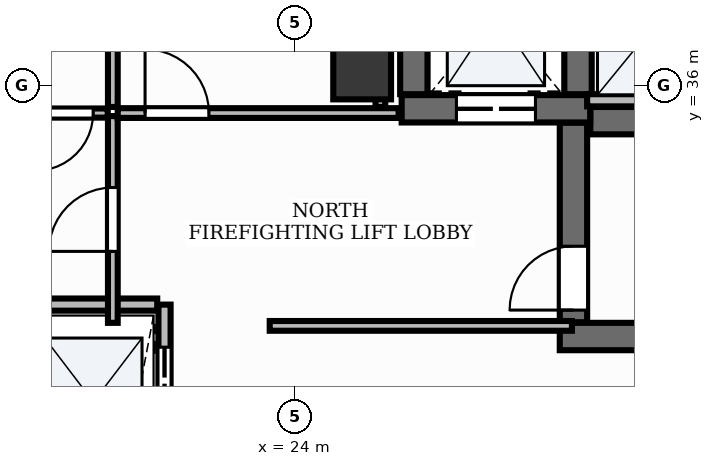
"""IFC4 building model, lengths in metres.
Left out: names, types, materials, properties, quantities, classifications, styles, units other than length and angle.
Written with IfcOpenShell. Run it as: python <this file> out.ifc"""

import sys

from ifc_helpers import new_model, si_unit, direction, frame, frame_2d, origin, origin_2d, place, context, subcontext, project, spatial, rectangle, extrude, element, fill, save


model = new_model("IFC4")
c1 = context("Model", 3, precision=1e-05, world=origin(), true_north=direction((0.0, 1.0)))
c2 = subcontext(c1, "Body", "Model", "MODEL_VIEW")
j1 = project(units=[si_unit("LENGTHUNIT", "METRE"), si_unit("PLANEANGLEUNIT", "RADIAN")], contexts=[c1])
p1 = place(None, origin())
s1 = spatial("IfcSite", under=j1, at=p1, CompositionType="ELEMENT")
p2 = place(p1, origin())
s2 = spatial("IfcBuilding", under=s1, at=p2, CompositionType="ELEMENT")
p3 = place(p2, origin())
s3 = spatial("IfcBuildingStorey", under=s2, at=p3, CompositionType="ELEMENT", Elevation=0.0)
p4 = place(p3, frame((28.852, 35.425, 0.0), z_axis=(0.0, 0.0, 1.0), x_axis=(1.0, 0.0, 0.0)))
e1 = element("IfcWall", 1, at=p4, inside=s3, PredefinedType="SHEAR", context=c2, shape_type="SweptSolid", body=[
    extrude(rectangle(XDim=8.248, YDim=0.45, at=frame_2d((4.124, 0.0))), origin(), (0.0, 0.0, 1.0), 5.1),
])
p5 = place(p3, frame((28.35, 31.875, 0.0), z_axis=(0.0, 0.0, 1.0), x_axis=(1.0, 0.0, 0.0)))
e2 = element("IfcWall", 2, at=p5, inside=s3, PredefinedType="SHEAR", context=c2, shape_type="SweptSolid", body=[
    extrude(rectangle(XDim=8.75, YDim=0.45, at=frame_2d((4.375, 0.0))), origin(), (0.0, 0.0, 1.0), 5.1),
])
p6 = place(p3, frame((28.575, 32.11, 0.0), z_axis=(0.0, 0.0, 1.0), x_axis=(0.0, 1.0, 0.0)))
e3 = element("IfcWall", 3, at=p6, inside=s3, PredefinedType="SHEAR", context=c2, shape_type="SweptSolid", body=[
    extrude(rectangle(XDim=3.283, YDim=0.45, at=frame_2d((1.642, 0.0))), origin(), (0.0, 0.0, 1.0), 5.1),
])
p7 = place(p6, frame((0.2, 0.0, 0.0)))
e4 = element("IfcOpeningElement", 4, at=p7, cuts=e3, PredefinedType="OPENING", context=c2, shape_type="SweptSolid", body=[
    extrude(rectangle(XDim=1.05, YDim=2.15, at=frame_2d((0.525, 1.075))), frame((0.0, 0.24, 0.0), z_axis=(0.0, -1.0, 0.0), x_axis=(1.0, 0.0, 0.0)), (0.0, 0.0, 1.0), 0.48),
])
p8 = place(p3, frame((25.75, 35.62, 0.0), z_axis=(0.0, 0.0, 1.0), x_axis=(1.0, 0.0, 0.0)))
e5 = element("IfcWall", 5, at=p8, inside=s3, PredefinedType="SHEAR", context=c2, shape_type="SweptSolid", body=[
    extrude(rectangle(XDim=3.1, YDim=0.45, at=frame_2d((1.55, 0.0))), origin(), (0.0, 0.0, 1.0), 5.1),
])
p9 = place(p8, frame((0.9, 0.0, 0.0)))
e6 = element("IfcOpeningElement", 6, at=p9, cuts=e5, PredefinedType="OPENING", context=c2, shape_type="SweptSolid", body=[
    extrude(rectangle(XDim=1.3, YDim=2.2, at=frame_2d((0.65, 1.1))), frame((0.0, 0.24, 0.0), z_axis=(0.0, -1.0, 0.0), x_axis=(1.0, 0.0, 0.0)), (0.0, 0.0, 1.0), 0.48),
])
for number, where, z_axis, x_axis in (
    (7, (25.95, 35.86, 0.0), (0.0, 0.0, 1.0), (0.0, 1.0, 0.0)),
    (8, (28.65, 35.86, 0.0), (0.0, 0.0, 1.0), (0.0, 1.0, 0.0)),
):
    element("IfcWall", number, at=place(p3, frame(where, z_axis=z_axis, x_axis=x_axis)), inside=s3, PredefinedType="SHEAR", context=c2, shape_type="SweptSolid", body=[
        extrude(rectangle(XDim=2.7, YDim=0.45, at=frame_2d((1.35, 0.0))), origin(), (0.0, 0.0, 1.0), 5.1),
    ])
p10 = place(p3, frame((25.1, 36.25, -0.0), z_axis=(0.0, 0.0, 1.0), x_axis=(1.0, 0.0, 0.0)))
e9 = element("IfcColumn", 9, at=p10, inside=s3, PredefinedType="PILASTER", context=c2, shape_type="SweptSolid", body=[
    extrude(rectangle(XDim=0.95, YDim=0.95, at=origin_2d()), origin(), (0.0, 0.0, 1.0), 5.101),
])
p11 = place(p3, frame((21.85, 21.6, 0.0), z_axis=(0.0, 0.0, 1.0), x_axis=(0.0, 1.0, 0.0)))
e10 = element("IfcWall", 10, at=p11, inside=s3, PredefinedType="PARTITIONING", context=c2, shape_type="SweptSolid", body=[
    extrude(rectangle(XDim=10.8, YDim=0.2, at=frame_2d((5.4, 0.0))), origin(), (0.0, 0.0, 1.0), 4.11),
])
p12 = place(p11, frame((0.9, 0.0, 0.0)))
e11 = element("IfcOpeningElement", 11, at=p12, cuts=e10, PredefinedType="OPENING", context=c2, shape_type="SweptSolid", body=[
    extrude(rectangle(XDim=1.1, YDim=2.2, at=frame_2d((0.55, 1.1))), frame((0.0, 0.115, 0.0), z_axis=(0.0, -1.0, 0.0), x_axis=(1.0, 0.0, 0.0)), (0.0, 0.0, 1.0), 0.23),
])
p13 = place(p11, frame((3.6, 0.0, 0.0)))
e12 = element("IfcOpeningElement", 12, at=p13, cuts=e10, PredefinedType="OPENING", context=c2, shape_type="SweptSolid", body=[
    extrude(rectangle(XDim=1.1, YDim=2.2, at=frame_2d((0.55, 1.1))), frame((0.0, 0.115, 0.0), z_axis=(0.0, -1.0, 0.0), x_axis=(1.0, 0.0, 0.0)), (0.0, 0.0, 1.0), 0.23),
])
p14 = place(p11, frame((6.3, 0.0, 0.0)))
e13 = element("IfcOpeningElement", 13, at=p14, cuts=e10, PredefinedType="OPENING", context=c2, shape_type="SweptSolid", body=[
    extrude(rectangle(XDim=1.1, YDim=2.2, at=frame_2d((0.55, 1.1))), frame((0.0, 0.115, 0.0), z_axis=(0.0, -1.0, 0.0), x_axis=(1.0, 0.0, 0.0)), (0.0, 0.0, 1.0), 0.23),
])
p15 = place(p11, frame((9.0, 0.0, 0.0)))
e14 = element("IfcOpeningElement", 14, at=p15, cuts=e10, PredefinedType="OPENING", context=c2, shape_type="SweptSolid", body=[
    extrude(rectangle(XDim=1.1, YDim=2.2, at=frame_2d((0.55, 1.1))), frame((0.0, 0.115, 0.0), z_axis=(0.0, -1.0, 0.0), x_axis=(1.0, 0.0, 0.0)), (0.0, 0.0, 1.0), 0.23),
])
p16 = place(p3, frame((19.62, 32.4, 0.0), z_axis=(0.0, 0.0, 1.0), x_axis=(1.0, 0.0, 0.0)))
e15 = element("IfcWall", 15, at=p16, inside=s3, PredefinedType="PARTITIONING", context=c2, shape_type="SweptSolid", body=[
    extrude(rectangle(XDim=2.11, YDim=0.2, at=frame_2d((1.055, 0.0))), origin(), (0.0, 0.0, 1.0), 4.11),
])
p17 = place(p3, frame((28.8, 35.76, 0.0), z_axis=(0.0, 0.0, 1.0), x_axis=(1.0, 0.0, 0.0)))
e16 = element("IfcWall", 16, at=p17, inside=s3, PredefinedType="PARTITIONING", context=c2, shape_type="SweptSolid", body=[
    extrude(rectangle(XDim=4.57, YDim=0.2, at=frame_2d((2.285, 0.0))), origin(), (0.0, 0.0, 1.0), 4.11),
])
p18 = place(p3, frame((21.0, 32.1, 0.0), z_axis=(0.0, 0.0, 1.0), x_axis=(0.0, 1.0, 0.0)))
e17 = element("IfcWall", 17, at=p18, inside=s3, PredefinedType="PARTITIONING", context=c2, shape_type="SweptSolid", body=[
    extrude(rectangle(XDim=3.4, YDim=0.16, at=frame_2d((1.7, 0.0))), origin(), (0.0, 0.0, 1.0), 4.11),
])
p19 = place(p18, frame((1.175, 0.0, 0.0)))
e18 = element("IfcOpeningElement", 18, at=p19, cuts=e17, PredefinedType="OPENING", context=c2, shape_type="SweptSolid", body=[
    extrude(rectangle(XDim=1.05, YDim=2.15, at=frame_2d((0.525, 1.075))), frame((0.0, 0.095, 0.0), z_axis=(0.0, -1.0, 0.0), x_axis=(1.0, 0.0, 0.0)), (0.0, 0.0, 1.0), 0.19),
])
p20 = place(p3, frame((23.58, 32.05, 0.0), z_axis=(0.0, 0.0, 1.0), x_axis=(1.0, 0.0, 0.0)))
e19 = element("IfcWall", 19, at=p20, inside=s3, PredefinedType="PARTITIONING", context=c2, shape_type="SweptSolid", body=[
    extrude(rectangle(XDim=4.97, YDim=0.16, at=frame_2d((2.485, 0.0))), origin(), (0.0, 0.0, 1.0), 4.11),
])
p21 = place(p3, frame((21.08, 35.55, 0.0), z_axis=(0.0, 0.0, 1.0), x_axis=(1.0, 0.0, 0.0)))
e20 = element("IfcWall", 20, at=p21, inside=s3, PredefinedType="PARTITIONING", context=c2, shape_type="SweptSolid", body=[
    extrude(rectangle(XDim=4.62, YDim=0.16, at=frame_2d((2.31, 0.0))), origin(), (0.0, 0.0, 1.0), 4.11),
])
p22 = place(p21, frame((0.45, 0.0, 0.0)))
e21 = element("IfcOpeningElement", 21, at=p22, cuts=e20, PredefinedType="OPENING", context=c2, shape_type="SweptSolid", body=[
    extrude(rectangle(XDim=1.05, YDim=2.15, at=frame_2d((0.525, 1.075))), frame((0.0, 0.095, 0.0), z_axis=(0.0, -1.0, 0.0), x_axis=(1.0, 0.0, 0.0)), (0.0, 0.0, 1.0), 0.19),
])
p23 = place(p3, frame((21.0, 48.55, 0.0), z_axis=(0.0, 0.0, 1.0), x_axis=(0.0, -1.0, 0.0)))
e22 = element("IfcWall", 22, at=p23, inside=s3, PredefinedType="PARTITIONING", context=c2, shape_type="SweptSolid", body=[
    extrude(rectangle(XDim=12.9, YDim=0.16, at=frame_2d((6.45, 0.0))), origin(), (0.0, 0.0, 1.0), 4.11),
])
p24 = place(p23, frame((5.5, 0.0, 0.0)))
e23 = element("IfcOpeningElement", 23, at=p24, cuts=e22, PredefinedType="OPENING", context=c2, shape_type="SweptSolid", body=[
    extrude(rectangle(XDim=1.05, YDim=2.15, at=frame_2d((0.525, 1.075))), frame((0.0, 0.095, 0.0), z_axis=(0.0, -1.0, 0.0), x_axis=(1.0, 0.0, 0.0)), (0.0, 0.0, 1.0), 0.19),
])
p25 = place(p3, frame((25.4, 35.65, 0.0), z_axis=(0.0, 0.0, 1.0), x_axis=(0.0, 1.0, 0.0)))
e24 = element("IfcWall", 24, at=p25, inside=s3, PredefinedType="PARTITIONING", context=c2, shape_type="SweptSolid", body=[
    extrude(rectangle(XDim=13.75, YDim=0.16, at=frame_2d((6.875, 0.0))), origin(), (0.0, 0.0, 1.0), 4.11),
])
p26 = place(p3, frame((20.916, 35.55, 0.0), z_axis=(0.0, 0.0, 1.0), x_axis=(-1.0, 0.0, 0.0)))
e25 = element("IfcWall", 25, at=p26, inside=s3, PredefinedType="PARTITIONING", context=c2, shape_type="SweptSolid", body=[
    extrude(rectangle(XDim=1.964, YDim=0.15, at=frame_2d((0.982, 0.0))), origin(), (0.0, 0.0, 1.0), 4.11),
])
p27 = place(p26, frame((0.24, 0.0, 0.0)))
e26 = element("IfcOpeningElement", 26, at=p27, cuts=e25, PredefinedType="OPENING", context=c2, shape_type="SweptSolid", body=[
    extrude(rectangle(XDim=0.95, YDim=2.15, at=frame_2d((0.475, 1.075))), frame((0.0, 0.09, 0.0), z_axis=(0.0, -1.0, 0.0), x_axis=(1.0, 0.0, 0.0)), (0.0, 0.0, 1.0), 0.18),
])
p28 = place(p7, origin())
e27 = element("IfcDoor", 27, at=p28, inside=s3, OperationType="SINGLE_SWING_LEFT", PredefinedType="DOOR", context=c2, shape_type="SweptSolid", body=[
    extrude(rectangle(XDim=1.05, YDim=2.15, at=frame_2d((0.525, 1.075))), frame((0.0, 0.025, 0.0), z_axis=(0.0, -1.0, 0.0), x_axis=(1.0, 0.0, 0.0)), (0.0, 0.0, 1.0), 0.05),
])
fill(e4, e27)
p29 = place(p15, origin())
e28 = element("IfcDoor", 28, at=p29, inside=s3, OperationType="DOUBLE_DOOR_SLIDING", PredefinedType="DOOR", context=c2, shape_type="SweptSolid", body=[
    extrude(rectangle(XDim=1.1, YDim=2.2, at=frame_2d((0.55, 1.1))), frame((0.0, 0.025, 0.0), z_axis=(0.0, -1.0, 0.0), x_axis=(1.0, 0.0, 0.0)), (0.0, 0.0, 1.0), 0.05),
])
fill(e14, e28)
p30 = place(p9, origin())
e29 = element("IfcDoor", 29, at=p30, inside=s3, OperationType="DOUBLE_DOOR_SLIDING", PredefinedType="DOOR", context=c2, shape_type="SweptSolid", body=[
    extrude(rectangle(XDim=1.3, YDim=2.2, at=frame_2d((0.65, 1.1))), frame((0.0, 0.025, 0.0), z_axis=(0.0, -1.0, 0.0), x_axis=(1.0, 0.0, 0.0)), (0.0, 0.0, 1.0), 0.05),
])
fill(e6, e29)
p31 = place(p19, origin())
e30 = element("IfcDoor", 30, at=p31, inside=s3, OperationType="SINGLE_SWING_LEFT", PredefinedType="DOOR", context=c2, shape_type="SweptSolid", body=[
    extrude(rectangle(XDim=1.05, YDim=2.15, at=frame_2d((0.525, 1.075))), frame((0.0, 0.025, 0.0), z_axis=(0.0, -1.0, 0.0), x_axis=(1.0, 0.0, 0.0)), (0.0, 0.0, 1.0), 0.05),
])
fill(e18, e30)
p32 = place(p22, origin())
e31 = element("IfcDoor", 31, at=p32, inside=s3, OperationType="SINGLE_SWING_LEFT", PredefinedType="DOOR", context=c2, shape_type="SweptSolid", body=[
    extrude(rectangle(XDim=1.05, YDim=2.15, at=frame_2d((0.525, 1.075))), frame((0.0, 0.025, 0.0), z_axis=(0.0, -1.0, 0.0), x_axis=(1.0, 0.0, 0.0)), (0.0, 0.0, 1.0), 0.05),
])
fill(e21, e31)
p33 = place(p27, origin())
e32 = element("IfcDoor", 32, at=p33, inside=s3, OperationType="SINGLE_SWING_RIGHT", PredefinedType="DOOR", context=c2, shape_type="SweptSolid", body=[
    extrude(rectangle(XDim=0.95, YDim=2.15, at=frame_2d((0.475, 1.075))), frame((0.0, 0.025, 0.0), z_axis=(0.0, -1.0, 0.0), x_axis=(1.0, 0.0, 0.0)), (0.0, 0.0, 1.0), 0.05),
])
fill(e26, e32)
save(model, sys.argv[1])
